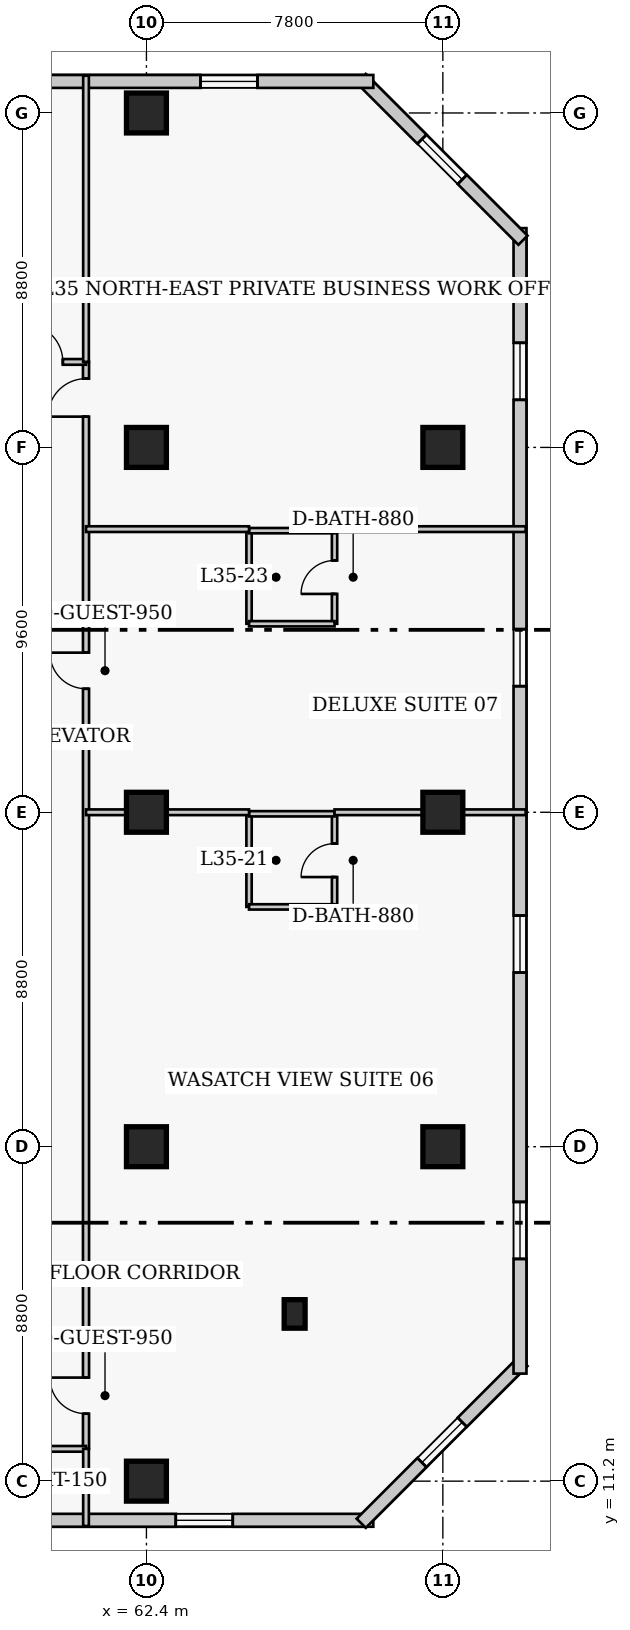
"""IFC4 building model, lengths in metres.
Left out: names, types, materials, properties, quantities, classifications, styles, units other than length and angle.
Written with IfcOpenShell. Run it as: python <this file> out.ifc"""

import sys

from ifc_helpers import new_model, si_unit, direction, frame, frame_2d, origin, origin_2d, place, context, subcontext, project, spatial, rectangle, extrude, element, fill, save


model = new_model("IFC4")
c1 = context("Model", 3, precision=1e-05, world=origin(), true_north=direction((0.0, 1.0)))
c2 = subcontext(c1, "Body", "Model", "MODEL_VIEW")
j1 = project(units=[si_unit("LENGTHUNIT", "METRE"), si_unit("PLANEANGLEUNIT", "RADIAN")], contexts=[c1])
p1 = place(None, origin())
s1 = spatial("IfcSite", under=j1, at=p1, CompositionType="ELEMENT")
p2 = place(p1, origin())
s2 = spatial("IfcBuilding", under=s1, at=p2, CompositionType="ELEMENT")
p3 = place(p2, frame((0.0, 0.0, 142.2)))
s3 = spatial("IfcBuildingStorey", under=s2, at=p3, CompositionType="ELEMENT", Elevation=142.2)
for number, where, z_axis, x_axis in (
    (1, (62.4, 11.2, 0.0), (0.0, 0.0, 1.0), (1.0, 0.0, 0.0)),
    (2, (62.4, 20.0, 0.0), (0.0, 0.0, 1.0), (1.0, 0.0, 0.0)),
    (3, (62.4, 28.8, 0.0), (0.0, 0.0, 1.0), (1.0, 0.0, 0.0)),
    (4, (62.4, 38.4, 0.0), (0.0, 0.0, 1.0), (1.0, 0.0, 0.0)),
    (5, (62.4, 47.2, 0.0), (0.0, 0.0, 1.0), (1.0, 0.0, 0.0)),
    (6, (70.2, 20.0, 0.0), (0.0, 0.0, 1.0), (1.0, 0.0, 0.0)),
    (7, (70.2, 28.8, 0.0), (0.0, 0.0, 1.0), (1.0, 0.0, 0.0)),
    (8, (70.2, 38.4, 0.0), (0.0, 0.0, 1.0), (1.0, 0.0, 0.0)),
):
    element("IfcColumn", number, at=place(p3, frame(where, z_axis=z_axis, x_axis=x_axis)), inside=s3, PredefinedType="COLUMN", context=c2, shape_type="SweptSolid", body=[
        extrude(rectangle(XDim=1.05, YDim=1.05, at=origin_2d()), origin(), (0.0, 0.0, 1.0), 3.8),
    ])
p4 = place(p3, frame((66.3, 15.6, 0.0), z_axis=(0.0, 0.0, 1.0), x_axis=(1.0, 0.0, 0.0)))
e9 = element("IfcColumn", 9, at=p4, inside=s3, PredefinedType="PILASTER", context=c2, shape_type="SweptSolid", body=[
    extrude(rectangle(XDim=0.55, YDim=0.75, at=origin_2d()), origin(), (0.0, 0.0, 1.0), 3.8),
])
p5 = place(p3, frame((41.68, 10.17, 0.0), z_axis=(0.0, 0.0, 1.0), x_axis=(1.0, 0.0, 0.0)))
e10 = element("IfcWall", 10, at=p5, inside=s3, PredefinedType="SOLIDWALL", context=c2, shape_type="SweptSolid", body=[
    extrude(rectangle(XDim=26.69, YDim=0.34, at=frame_2d((13.345, 0.0))), origin(), (0.0, 0.0, 1.0), 3.55),
])
p6 = place(p5, frame((2.548, 0.0, 0.85)))
e11 = element("IfcOpeningElement", 11, at=p6, cuts=e10, PredefinedType="OPENING", context=c2, shape_type="SweptSolid", body=[
    extrude(rectangle(XDim=1.5, YDim=1.75, at=frame_2d((0.75, 0.875))), frame((0.0, 0.18, 0.0), z_axis=(0.0, -1.0, 0.0), x_axis=(1.0, 0.0, 0.0)), (0.0, 0.0, 1.0), 0.36),
])
p7 = place(p5, frame((13.745, 0.0, 0.85)))
e12 = element("IfcOpeningElement", 12, at=p7, cuts=e10, PredefinedType="OPENING", context=c2, shape_type="SweptSolid", body=[
    extrude(rectangle(XDim=1.5, YDim=1.75, at=frame_2d((0.75, 0.875))), frame((0.0, 0.18, 0.0), z_axis=(0.0, -1.0, 0.0), x_axis=(1.0, 0.0, 0.0)), (0.0, 0.0, 1.0), 0.36),
])
p8 = place(p5, frame((21.492, 0.0, 0.85)))
e13 = element("IfcOpeningElement", 13, at=p8, cuts=e10, PredefinedType="OPENING", context=c2, shape_type="SweptSolid", body=[
    extrude(rectangle(XDim=1.5, YDim=1.75, at=frame_2d((0.75, 0.875))), frame((0.0, 0.18, 0.0), z_axis=(0.0, -1.0, 0.0), x_axis=(1.0, 0.0, 0.0)), (0.0, 0.0, 1.0), 0.36),
])
p9 = place(p3, frame((68.052, 10.092, 0.0), z_axis=(0.0, 0.0, 1.0), x_axis=(0.707106781187, 0.707106781187, 0.0)))
e14 = element("IfcWall", 14, at=p9, inside=s3, PredefinedType="SOLIDWALL", context=c2, shape_type="SweptSolid", body=[
    extrude(rectangle(XDim=6.02, YDim=0.34, at=frame_2d((3.01, 0.0))), origin(), (0.0, 0.0, 1.0), 3.55),
])
p10 = place(p9, frame((2.26, 0.0, 0.85)))
e15 = element("IfcOpeningElement", 15, at=p10, cuts=e14, PredefinedType="OPENING", context=c2, shape_type="SweptSolid", body=[
    extrude(rectangle(XDim=1.5, YDim=1.75, at=frame_2d((0.75, 0.875))), frame((0.0, 0.18, 0.0), z_axis=(0.0, -1.0, 0.0), x_axis=(1.0, 0.0, 0.0)), (0.0, 0.0, 1.0), 0.36),
])
p11 = place(p3, frame((72.23, 14.03, 0.0), z_axis=(0.0, 0.0, 1.0), x_axis=(0.0, 1.0, 0.0)))
e16 = element("IfcWall", 16, at=p11, inside=s3, PredefinedType="SOLIDWALL", context=c2, shape_type="SweptSolid", body=[
    extrude(rectangle(XDim=30.14, YDim=0.34, at=frame_2d((15.07, 0.0))), origin(), (0.0, 0.0, 1.0), 3.55),
])
p12 = place(p11, frame((3.018, 0.0, 0.85)))
e17 = element("IfcOpeningElement", 17, at=p12, cuts=e16, PredefinedType="OPENING", context=c2, shape_type="SweptSolid", body=[
    extrude(rectangle(XDim=1.5, YDim=1.75, at=frame_2d((0.75, 0.875))), frame((0.0, 0.18, 0.0), z_axis=(0.0, -1.0, 0.0), x_axis=(1.0, 0.0, 0.0)), (0.0, 0.0, 1.0), 0.36),
])
p13 = place(p11, frame((10.552, 0.0, 0.85)))
e18 = element("IfcOpeningElement", 18, at=p13, cuts=e16, PredefinedType="OPENING", context=c2, shape_type="SweptSolid", body=[
    extrude(rectangle(XDim=1.5, YDim=1.75, at=frame_2d((0.75, 0.875))), frame((0.0, 0.18, 0.0), z_axis=(0.0, -1.0, 0.0), x_axis=(1.0, 0.0, 0.0)), (0.0, 0.0, 1.0), 0.36),
])
p14 = place(p11, frame((18.087, 0.0, 0.85)))
e19 = element("IfcOpeningElement", 19, at=p14, cuts=e16, PredefinedType="OPENING", context=c2, shape_type="SweptSolid", body=[
    extrude(rectangle(XDim=1.5, YDim=1.75, at=frame_2d((0.75, 0.875))), frame((0.0, 0.18, 0.0), z_axis=(0.0, -1.0, 0.0), x_axis=(1.0, 0.0, 0.0)), (0.0, 0.0, 1.0), 0.36),
])
p15 = place(p11, frame((25.623, 0.0, 0.85)))
e20 = element("IfcOpeningElement", 20, at=p15, cuts=e16, PredefinedType="OPENING", context=c2, shape_type="SweptSolid", body=[
    extrude(rectangle(XDim=1.5, YDim=1.75, at=frame_2d((0.75, 0.875))), frame((0.0, 0.18, 0.0), z_axis=(0.0, -1.0, 0.0), x_axis=(1.0, 0.0, 0.0)), (0.0, 0.0, 1.0), 0.36),
])
p16 = place(p3, frame((72.308, 43.852, 0.0), z_axis=(0.0, 0.0, 1.0), x_axis=(-0.707106781187, 0.707106781187, 0.0)))
e21 = element("IfcWall", 21, at=p16, inside=s3, PredefinedType="SOLIDWALL", context=c2, shape_type="SweptSolid", body=[
    extrude(rectangle(XDim=6.02, YDim=0.34, at=frame_2d((3.01, 0.0))), origin(), (0.0, 0.0, 1.0), 3.55),
])
p17 = place(p16, frame((2.26, 0.0, 0.85)))
e22 = element("IfcOpeningElement", 22, at=p17, cuts=e21, PredefinedType="OPENING", context=c2, shape_type="SweptSolid", body=[
    extrude(rectangle(XDim=1.5, YDim=1.75, at=frame_2d((0.75, 0.875))), frame((0.0, 0.18, 0.0), z_axis=(0.0, -1.0, 0.0), x_axis=(1.0, 0.0, 0.0)), (0.0, 0.0, 1.0), 0.36),
])
p18 = place(p3, frame((68.37, 48.03, 0.0), z_axis=(0.0, 0.0, 1.0), x_axis=(-1.0, 0.0, 0.0)))
e23 = element("IfcWall", 23, at=p18, inside=s3, PredefinedType="SOLIDWALL", context=c2, shape_type="SweptSolid", body=[
    extrude(rectangle(XDim=26.69, YDim=0.34, at=frame_2d((13.345, 0.0))), origin(), (0.0, 0.0, 1.0), 3.55),
])
p19 = place(p18, frame((3.048, 0.0, 0.85)))
e24 = element("IfcOpeningElement", 24, at=p19, cuts=e23, PredefinedType="OPENING", context=c2, shape_type="SweptSolid", body=[
    extrude(rectangle(XDim=1.5, YDim=1.75, at=frame_2d((0.75, 0.875))), frame((0.0, 0.18, 0.0), z_axis=(0.0, -1.0, 0.0), x_axis=(1.0, 0.0, 0.0)), (0.0, 0.0, 1.0), 0.36),
])
p20 = place(p18, frame((11.445, 0.0, 0.85)))
e25 = element("IfcOpeningElement", 25, at=p20, cuts=e23, PredefinedType="OPENING", context=c2, shape_type="SweptSolid", body=[
    extrude(rectangle(XDim=1.5, YDim=1.75, at=frame_2d((0.75, 0.875))), frame((0.0, 0.18, 0.0), z_axis=(0.0, -1.0, 0.0), x_axis=(1.0, 0.0, 0.0)), (0.0, 0.0, 1.0), 0.36),
])
p21 = place(p18, frame((22.642, 0.0, 0.85)))
e26 = element("IfcOpeningElement", 26, at=p21, cuts=e23, PredefinedType="OPENING", context=c2, shape_type="SweptSolid", body=[
    extrude(rectangle(XDim=1.5, YDim=1.75, at=frame_2d((0.75, 0.875))), frame((0.0, 0.18, 0.0), z_axis=(0.0, -1.0, 0.0), x_axis=(1.0, 0.0, 0.0)), (0.0, 0.0, 1.0), 0.36),
])
p22 = place(p3, frame((60.81, 12.05, 0.0), z_axis=(0.0, 0.0, 1.0), x_axis=(0.0, 1.0, 0.0)))
e27 = element("IfcWall", 27, at=p22, inside=s3, PredefinedType="PARTITIONING", context=c2, shape_type="SweptSolid", body=[
    extrude(rectangle(XDim=28.6, YDim=0.16, at=frame_2d((14.3, 0.0))), origin(), (0.0, 0.0, 1.0), 3.55),
])
p23 = place(p22, frame((0.925, 0.0, 0.0)))
e28 = element("IfcOpeningElement", 28, at=p23, cuts=e27, PredefinedType="OPENING", context=c2, shape_type="SweptSolid", body=[
    extrude(rectangle(XDim=0.95, YDim=2.1, at=frame_2d((0.475, 1.05))), frame((0.0, 0.09, 0.0), z_axis=(0.0, -1.0, 0.0), x_axis=(1.0, 0.0, 0.0)), (0.0, 0.0, 1.0), 0.18),
])
p24 = place(p22, frame((20.0, 0.0, 0.0)))
e29 = element("IfcOpeningElement", 29, at=p24, cuts=e27, PredefinedType="OPENING", context=c2, shape_type="SweptSolid", body=[
    extrude(rectangle(XDim=0.95, YDim=2.1, at=frame_2d((0.475, 1.05))), frame((0.0, 0.09, 0.0), z_axis=(0.0, -1.0, 0.0), x_axis=(1.0, 0.0, 0.0)), (0.0, 0.0, 1.0), 0.18),
])
p25 = place(p22, frame((27.16, 0.0, 0.0)))
e30 = element("IfcOpeningElement", 30, at=p25, cuts=e27, PredefinedType="OPENING", context=c2, shape_type="SweptSolid", body=[
    extrude(rectangle(XDim=1.0, YDim=2.15, at=frame_2d((0.5, 1.075))), frame((0.0, 0.09, 0.0), z_axis=(0.0, -1.0, 0.0), x_axis=(1.0, 0.0, 0.0)), (0.0, 0.0, 1.0), 0.18),
])
p26 = place(p3, frame((58.59, 12.05, 0.0), z_axis=(0.0, 0.0, 1.0), x_axis=(1.0, 0.0, 0.0)))
e31 = element("IfcWall", 31, at=p26, inside=s3, PredefinedType="PARTITIONING", context=c2, shape_type="SweptSolid", body=[
    extrude(rectangle(XDim=2.22, YDim=0.15, at=frame_2d((1.11, 0.0))), origin(), (0.0, 0.0, 1.0), 3.55),
])
p27 = place(p3, frame((56.8, 40.65, 0.0), z_axis=(0.0, 0.0, 1.0), x_axis=(1.0, 0.0, 0.0)))
e32 = element("IfcWall", 32, at=p27, inside=s3, PredefinedType="PARTITIONING", context=c2, shape_type="SweptSolid", body=[
    extrude(rectangle(XDim=4.01, YDim=0.15, at=frame_2d((2.005, 0.0))), origin(), (0.0, 0.0, 1.0), 3.55),
])
p28 = place(p27, frame((2.4, 0.0, 0.0)))
e33 = element("IfcOpeningElement", 33, at=p28, cuts=e32, PredefinedType="OPENING", context=c2, shape_type="SweptSolid", body=[
    extrude(rectangle(XDim=1.0, YDim=2.15, at=frame_2d((0.5, 1.075))), frame((0.0, 0.085, 0.0), z_axis=(0.0, -1.0, 0.0), x_axis=(1.0, 0.0, 0.0)), (0.0, 0.0, 1.0), 0.17),
])
p29 = place(p3, frame((60.81, 40.65, 0.0), z_axis=(0.0, 0.0, 1.0), x_axis=(0.0, 1.0, 0.0)))
e34 = element("IfcWall", 34, at=p29, inside=s3, PredefinedType="PARTITIONING", context=c2, shape_type="SweptSolid", body=[
    extrude(rectangle(XDim=7.53, YDim=0.15, at=frame_2d((3.765, 0.0))), origin(), (0.0, 0.0, 1.0), 3.55),
])
p30 = place(p3, frame((60.81, 10.02, 0.0), z_axis=(0.0, 0.0, 1.0), x_axis=(0.0, 1.0, 0.0)))
e35 = element("IfcWall", 35, at=p30, inside=s3, PredefinedType="PARTITIONING", context=c2, shape_type="SweptSolid", body=[
    extrude(rectangle(XDim=2.03, YDim=0.15, at=frame_2d((1.015, 0.0))), origin(), (0.0, 0.0, 1.0), 3.55),
])
p31 = place(p3, frame((65.1, 26.31, 0.0), z_axis=(0.0, 0.0, 1.0), x_axis=(0.0, 1.0, 0.0)))
e36 = element("IfcWall", 36, at=p31, inside=s3, PredefinedType="PLUMBINGWALL", context=c2, shape_type="SweptSolid", body=[
    extrude(rectangle(XDim=2.45, YDim=0.14, at=frame_2d((1.225, 0.0))), origin(), (0.0, 0.0, 1.0), 3.55),
])
p32 = place(p3, frame((67.35, 26.31, 0.0), z_axis=(0.0, 0.0, 1.0), x_axis=(0.0, 1.0, 0.0)))
e37 = element("IfcWall", 37, at=p32, inside=s3, PredefinedType="PLUMBINGWALL", context=c2, shape_type="SweptSolid", body=[
    extrude(rectangle(XDim=2.45, YDim=0.14, at=frame_2d((1.225, 0.0))), origin(), (0.0, 0.0, 1.0), 3.55),
])
p33 = place(p32, frame((0.785, 0.0, 0.0)))
e38 = element("IfcOpeningElement", 38, at=p33, cuts=e37, PredefinedType="OPENING", context=c2, shape_type="SweptSolid", body=[
    extrude(rectangle(XDim=0.88, YDim=2.05, at=frame_2d((0.44, 1.025))), frame((0.0, 0.08, 0.0), z_axis=(0.0, -1.0, 0.0), x_axis=(1.0, 0.0, 0.0)), (0.0, 0.0, 1.0), 0.16),
])
p34 = place(p3, frame((65.1, 26.31, 0.0), z_axis=(0.0, 0.0, 1.0), x_axis=(1.0, 0.0, 0.0)))
e39 = element("IfcWall", 39, at=p34, inside=s3, PredefinedType="PLUMBINGWALL", context=c2, shape_type="SweptSolid", body=[
    extrude(rectangle(XDim=2.25, YDim=0.14, at=frame_2d((1.125, 0.0))), origin(), (0.0, 0.0, 1.0), 3.55),
])
p35 = place(p3, frame((65.1, 28.76, 0.0), z_axis=(0.0, 0.0, 1.0), x_axis=(1.0, 0.0, 0.0)))
e40 = element("IfcWall", 40, at=p35, inside=s3, PredefinedType="PLUMBINGWALL", context=c2, shape_type="SweptSolid", body=[
    extrude(rectangle(XDim=2.25, YDim=0.14, at=frame_2d((1.125, 0.0))), origin(), (0.0, 0.0, 1.0), 2.9),
])
p36 = place(p3, frame((60.81, 28.8, 0.0), z_axis=(0.0, 0.0, 1.0), x_axis=(1.0, 0.0, 0.0)))
e41 = element("IfcWall", 41, at=p36, inside=s3, PredefinedType="PARTITIONING", context=c2, shape_type="SweptSolid", body=[
    extrude(rectangle(XDim=4.29, YDim=0.15, at=frame_2d((2.145, 0.0))), origin(), (0.0, 0.0, 1.0), 2.778),
])
p37 = place(p3, frame((67.35, 28.8, 0.0), z_axis=(0.0, 0.0, 1.0), x_axis=(1.0, 0.0, 0.0)))
e42 = element("IfcWall", 42, at=p37, inside=s3, PredefinedType="PARTITIONING", context=c2, shape_type="SweptSolid", body=[
    extrude(rectangle(XDim=5.03, YDim=0.15, at=frame_2d((2.515, 0.0))), origin(), (0.0, 0.0, 1.0), 2.778),
])
p38 = place(p3, frame((65.1, 33.76, 0.0), z_axis=(0.0, 0.0, 1.0), x_axis=(0.0, 1.0, 0.0)))
e43 = element("IfcWall", 43, at=p38, inside=s3, PredefinedType="PLUMBINGWALL", context=c2, shape_type="SweptSolid", body=[
    extrude(rectangle(XDim=2.45, YDim=0.14, at=frame_2d((1.225, 0.0))), origin(), (0.0, 0.0, 1.0), 3.55),
])
p39 = place(p3, frame((67.35, 33.76, 0.0), z_axis=(0.0, 0.0, 1.0), x_axis=(0.0, 1.0, 0.0)))
e44 = element("IfcWall", 44, at=p39, inside=s3, PredefinedType="PLUMBINGWALL", context=c2, shape_type="SweptSolid", body=[
    extrude(rectangle(XDim=2.45, YDim=0.14, at=frame_2d((1.225, 0.0))), origin(), (0.0, 0.0, 1.0), 3.55),
])
p40 = place(p39, frame((0.785, 0.0, 0.0)))
e45 = element("IfcOpeningElement", 45, at=p40, cuts=e44, PredefinedType="OPENING", context=c2, shape_type="SweptSolid", body=[
    extrude(rectangle(XDim=0.88, YDim=2.05, at=frame_2d((0.44, 1.025))), frame((0.0, 0.08, 0.0), z_axis=(0.0, -1.0, 0.0), x_axis=(1.0, 0.0, 0.0)), (0.0, 0.0, 1.0), 0.16),
])
for number, where, z_axis, x_axis in (
    (46, (65.1, 33.76, 0.0), (0.0, 0.0, 1.0), (1.0, 0.0, 0.0)),
    (47, (65.1, 36.21, 0.0), (0.0, 0.0, 1.0), (1.0, 0.0, 0.0)),
):
    element("IfcWall", number, at=place(p3, frame(where, z_axis=z_axis, x_axis=x_axis)), inside=s3, PredefinedType="PLUMBINGWALL", context=c2, shape_type="SweptSolid", body=[
        extrude(rectangle(XDim=2.25, YDim=0.14, at=frame_2d((1.125, 0.0))), origin(), (0.0, 0.0, 1.0), 3.55),
    ])
p41 = place(p3, frame((60.81, 36.25, 0.0), z_axis=(0.0, 0.0, 1.0), x_axis=(1.0, 0.0, 0.0)))
e48 = element("IfcWall", 48, at=p41, inside=s3, PredefinedType="PARTITIONING", context=c2, shape_type="SweptSolid", body=[
    extrude(rectangle(XDim=4.29, YDim=0.15, at=frame_2d((2.145, 0.0))), origin(), (0.0, 0.0, 1.0), 3.55),
])
p42 = place(p3, frame((67.35, 36.25, 0.0), z_axis=(0.0, 0.0, 1.0), x_axis=(1.0, 0.0, 0.0)))
e49 = element("IfcWall", 49, at=p42, inside=s3, PredefinedType="PARTITIONING", context=c2, shape_type="SweptSolid", body=[
    extrude(rectangle(XDim=5.03, YDim=0.15, at=frame_2d((2.515, 0.0))), origin(), (0.0, 0.0, 1.0), 3.55),
])
p43 = place(p8, origin())
e50 = element("IfcWindow", 50, at=p43, inside=s3, PartitioningType="SINGLE_PANEL", PredefinedType="WINDOW", context=c2, shape_type="SweptSolid", body=[
    extrude(rectangle(XDim=1.5, YDim=1.75, at=frame_2d((0.75, 0.875))), frame((0.0, 0.03, 0.0), z_axis=(0.0, -1.0, 0.0), x_axis=(1.0, 0.0, 0.0)), (0.0, 0.0, 1.0), 0.06),
])
fill(e13, e50)
p44 = place(p10, origin())
e51 = element("IfcWindow", 51, at=p44, inside=s3, PartitioningType="SINGLE_PANEL", PredefinedType="WINDOW", context=c2, shape_type="SweptSolid", body=[
    extrude(rectangle(XDim=1.5, YDim=1.75, at=frame_2d((0.75, 0.875))), frame((0.0, 0.03, 0.0), z_axis=(0.0, -1.0, 0.0), x_axis=(1.0, 0.0, 0.0)), (0.0, 0.0, 1.0), 0.06),
])
fill(e15, e51)
p45 = place(p12, origin())
e52 = element("IfcWindow", 52, at=p45, inside=s3, PartitioningType="SINGLE_PANEL", PredefinedType="WINDOW", context=c2, shape_type="SweptSolid", body=[
    extrude(rectangle(XDim=1.5, YDim=1.75, at=frame_2d((0.75, 0.875))), frame((0.0, 0.03, 0.0), z_axis=(0.0, -1.0, 0.0), x_axis=(1.0, 0.0, 0.0)), (0.0, 0.0, 1.0), 0.06),
])
fill(e17, e52)
p46 = place(p13, origin())
e53 = element("IfcWindow", 53, at=p46, inside=s3, PartitioningType="SINGLE_PANEL", PredefinedType="WINDOW", context=c2, shape_type="SweptSolid", body=[
    extrude(rectangle(XDim=1.5, YDim=1.75, at=frame_2d((0.75, 0.875))), frame((0.0, 0.03, 0.0), z_axis=(0.0, -1.0, 0.0), x_axis=(1.0, 0.0, 0.0)), (0.0, 0.0, 1.0), 0.06),
])
fill(e18, e53)
p47 = place(p14, origin())
e54 = element("IfcWindow", 54, at=p47, inside=s3, PartitioningType="SINGLE_PANEL", PredefinedType="WINDOW", context=c2, shape_type="SweptSolid", body=[
    extrude(rectangle(XDim=1.5, YDim=1.75, at=frame_2d((0.75, 0.875))), frame((0.0, 0.03, 0.0), z_axis=(0.0, -1.0, 0.0), x_axis=(1.0, 0.0, 0.0)), (0.0, 0.0, 1.0), 0.06),
])
fill(e19, e54)
p48 = place(p15, origin())
e55 = element("IfcWindow", 55, at=p48, inside=s3, PartitioningType="SINGLE_PANEL", PredefinedType="WINDOW", context=c2, shape_type="SweptSolid", body=[
    extrude(rectangle(XDim=1.5, YDim=1.75, at=frame_2d((0.75, 0.875))), frame((0.0, 0.03, 0.0), z_axis=(0.0, -1.0, 0.0), x_axis=(1.0, 0.0, 0.0)), (0.0, 0.0, 1.0), 0.06),
])
fill(e20, e55)
p49 = place(p17, origin())
e56 = element("IfcWindow", 56, at=p49, inside=s3, PartitioningType="SINGLE_PANEL", PredefinedType="WINDOW", context=c2, shape_type="SweptSolid", body=[
    extrude(rectangle(XDim=1.5, YDim=1.75, at=frame_2d((0.75, 0.875))), frame((0.0, 0.03, 0.0), z_axis=(0.0, -1.0, 0.0), x_axis=(1.0, 0.0, 0.0)), (0.0, 0.0, 1.0), 0.06),
])
fill(e22, e56)
p50 = place(p19, origin())
e57 = element("IfcWindow", 57, at=p50, inside=s3, PartitioningType="SINGLE_PANEL", PredefinedType="WINDOW", context=c2, shape_type="SweptSolid", body=[
    extrude(rectangle(XDim=1.5, YDim=1.75, at=frame_2d((0.75, 0.875))), frame((0.0, 0.03, 0.0), z_axis=(0.0, -1.0, 0.0), x_axis=(1.0, 0.0, 0.0)), (0.0, 0.0, 1.0), 0.06),
])
fill(e24, e57)
p51 = place(p28, origin())
e58 = element("IfcDoor", 58, at=p51, inside=s3, OperationType="SINGLE_SWING_LEFT", PredefinedType="DOOR", context=c2, shape_type="SweptSolid", body=[
    extrude(rectangle(XDim=1.0, YDim=2.15, at=frame_2d((0.5, 1.075))), frame((0.0, 0.025, 0.0), z_axis=(0.0, -1.0, 0.0), x_axis=(1.0, 0.0, 0.0)), (0.0, 0.0, 1.0), 0.05),
])
fill(e33, e58)
p52 = place(p33, origin())
e59 = element("IfcDoor", 59, at=p52, inside=s3, OperationType="SINGLE_SWING_LEFT", PredefinedType="DOOR", context=c2, shape_type="SweptSolid", body=[
    extrude(rectangle(XDim=0.88, YDim=2.05, at=frame_2d((0.44, 1.025))), frame((0.0, 0.025, 0.0), z_axis=(0.0, -1.0, 0.0), x_axis=(1.0, 0.0, 0.0)), (0.0, 0.0, 1.0), 0.05),
])
fill(e38, e59)
p53 = place(p23, origin())
e60 = element("IfcDoor", 60, at=p53, inside=s3, OperationType="SINGLE_SWING_RIGHT", PredefinedType="DOOR", context=c2, shape_type="SweptSolid", body=[
    extrude(rectangle(XDim=0.95, YDim=2.1, at=frame_2d((0.475, 1.05))), frame((0.0, 0.025, 0.0), z_axis=(0.0, -1.0, 0.0), x_axis=(1.0, 0.0, 0.0)), (0.0, 0.0, 1.0), 0.05),
])
fill(e28, e60)
p54 = place(p40, origin())
e61 = element("IfcDoor", 61, at=p54, inside=s3, OperationType="SINGLE_SWING_LEFT", PredefinedType="DOOR", context=c2, shape_type="SweptSolid", body=[
    extrude(rectangle(XDim=0.88, YDim=2.05, at=frame_2d((0.44, 1.025))), frame((0.0, 0.025, 0.0), z_axis=(0.0, -1.0, 0.0), x_axis=(1.0, 0.0, 0.0)), (0.0, 0.0, 1.0), 0.05),
])
fill(e45, e61)
p55 = place(p24, origin())
e62 = element("IfcDoor", 62, at=p55, inside=s3, OperationType="SINGLE_SWING_RIGHT", PredefinedType="DOOR", context=c2, shape_type="SweptSolid", body=[
    extrude(rectangle(XDim=0.95, YDim=2.1, at=frame_2d((0.475, 1.05))), frame((0.0, 0.025, 0.0), z_axis=(0.0, -1.0, 0.0), x_axis=(1.0, 0.0, 0.0)), (0.0, 0.0, 1.0), 0.05),
])
fill(e29, e62)
p56 = place(p25, origin())
e63 = element("IfcDoor", 63, at=p56, inside=s3, OperationType="SINGLE_SWING_LEFT", PredefinedType="DOOR", context=c2, shape_type="SweptSolid", body=[
    extrude(rectangle(XDim=1.0, YDim=2.15, at=frame_2d((0.5, 1.075))), frame((0.0, 0.025, 0.0), z_axis=(0.0, -1.0, 0.0), x_axis=(1.0, 0.0, 0.0)), (0.0, 0.0, 1.0), 0.05),
])
fill(e30, e63)
save(model, sys.argv[1])
